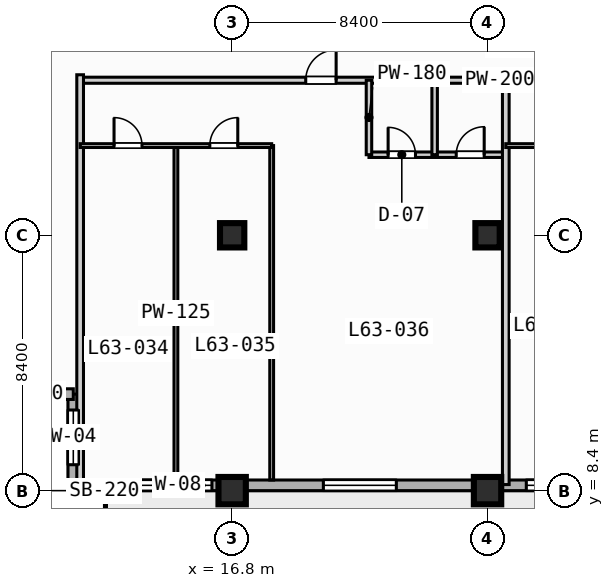
"""IFC4 building model, lengths in metres.
Left out: names, types, materials, properties, quantities, classifications, styles, units other than length and angle.
Written with IfcOpenShell. Run it as: python <this file> out.ifc"""

import sys

from ifc_helpers import new_model, si_unit, direction, frame, frame_2d, origin, origin_2d, place, context, subcontext, project, spatial, rectangle, extrude, element, fill, save


model = new_model("IFC4")
c1 = context("Model", 3, precision=1e-05, world=origin(), true_north=direction((0.0, 1.0)))
c2 = subcontext(c1, "Body", "Model", "MODEL_VIEW")
j1 = project(units=[si_unit("LENGTHUNIT", "METRE"), si_unit("PLANEANGLEUNIT", "RADIAN")], contexts=[c1])
p1 = place(None, origin())
s1 = spatial("IfcSite", under=j1, at=p1, CompositionType="ELEMENT")
p2 = place(p1, origin())
s2 = spatial("IfcBuilding", under=s1, at=p2, CompositionType="ELEMENT")
p3 = place(p2, frame((0.0, 0.0, 256.4)))
s3 = spatial("IfcBuildingStorey", under=s2, at=p3, CompositionType="ELEMENT", Elevation=256.4)
p4 = place(p3, frame((16.8, 8.4, 0.0), z_axis=(0.0, 0.0, 1.0), x_axis=(1.0, 0.0, 0.0)))
e1 = element("IfcColumn", 1, at=p4, inside=s3, PredefinedType="COLUMN", context=c2, shape_type="SweptSolid", body=[
    extrude(rectangle(XDim=0.9, YDim=0.9, at=origin_2d()), origin(), (0.0, 0.0, 1.0), 3.7),
])
p5 = place(p3, frame((16.8, 16.8, 0.0), z_axis=(0.0, 0.0, 1.0), x_axis=(1.0, 0.0, 0.0)))
e2 = element("IfcColumn", 2, at=p5, inside=s3, PredefinedType="COLUMN", context=c2, shape_type="SweptSolid", body=[
    extrude(rectangle(XDim=0.8, YDim=0.8, at=origin_2d()), origin(), (0.0, 0.0, 1.0), 3.7),
])
p6 = place(p3, frame((25.2, 8.4, 0.0), z_axis=(0.0, 0.0, 1.0), x_axis=(1.0, 0.0, 0.0)))
e3 = element("IfcColumn", 3, at=p6, inside=s3, PredefinedType="COLUMN", context=c2, shape_type="SweptSolid", body=[
    extrude(rectangle(XDim=0.9, YDim=0.9, at=origin_2d()), origin(), (0.0, 0.0, 1.0), 3.7),
])
p7 = place(p3, frame((25.2, 16.8, 0.0), z_axis=(0.0, 0.0, 1.0), x_axis=(1.0, 0.0, 0.0)))
e4 = element("IfcColumn", 4, at=p7, inside=s3, PredefinedType="COLUMN", context=c2, shape_type="SweptSolid", body=[
    extrude(rectangle(XDim=0.8, YDim=0.8, at=origin_2d()), origin(), (0.0, 0.0, 1.0), 3.7),
])
p8 = place(p3, frame((11.575, 8.575, 0.0), z_axis=(0.0, 0.0, 1.0), x_axis=(0.0, 1.0, 0.0)))
e5 = element("IfcWall", 5, at=p8, inside=s3, PredefinedType="STANDARD", context=c2, shape_type="SweptSolid", body=[
    extrude(rectangle(XDim=3.0, YDim=0.35, at=frame_2d((1.5, 0.0))), origin(), (0.0, 0.0, 1.0), 3.47),
])
p9 = place(p8, frame((0.677, 0.0, 0.85)))
e6 = element("IfcOpeningElement", 6, at=p9, cuts=e5, PredefinedType="OPENING", context=c2, shape_type="SweptSolid", body=[
    extrude(rectangle(XDim=1.8, YDim=1.8, at=frame_2d((0.9, 0.9))), frame((0.0, 0.185, 0.0), z_axis=(0.0, -1.0, 0.0), x_axis=(1.0, 0.0, 0.0)), (0.0, 0.0, 1.0), 0.37),
])
p10 = place(p3, frame((11.575, 11.575, 0.0), z_axis=(0.0, 0.0, 1.0), x_axis=(-1.0, 0.0, 0.0)))
e7 = element("IfcWall", 7, at=p10, inside=s3, PredefinedType="STANDARD", context=c2, shape_type="SweptSolid", body=[
    extrude(rectangle(XDim=3.0, YDim=0.35, at=frame_2d((1.5, 0.0))), origin(), (0.0, 0.0, 1.0), 3.47),
])
p11 = place(p3, frame((72.425, 8.575, 0.0), z_axis=(0.0, 0.0, 1.0), x_axis=(-1.0, 0.0, 0.0)))
e8 = element("IfcWall", 8, at=p11, inside=s3, PredefinedType="STANDARD", context=c2, shape_type="SweptSolid", body=[
    extrude(rectangle(XDim=60.85, YDim=0.35, at=frame_2d((30.425, 0.0))), origin(), (0.0, 0.0, 1.0), 3.47),
])
p12 = place(p11, frame((41.325, 0.0, 0.0)))
e9 = element("IfcOpeningElement", 9, at=p12, cuts=e8, PredefinedType="OPENING", context=c2, shape_type="SweptSolid", body=[
    extrude(rectangle(XDim=1.4, YDim=2.2, at=frame_2d((0.7, 1.1))), frame((0.0, 0.185, 0.0), z_axis=(0.0, -1.0, 0.0), x_axis=(1.0, 0.0, 0.0)), (0.0, 0.0, 1.0), 0.37),
])
p13 = place(p11, frame((50.225, 0.0, 0.85)))
e10 = element("IfcOpeningElement", 10, at=p13, cuts=e8, PredefinedType="OPENING", context=c2, shape_type="SweptSolid", body=[
    extrude(rectangle(XDim=2.4, YDim=1.95, at=frame_2d((1.2, 0.975))), frame((0.0, 0.185, 0.0), z_axis=(0.0, -1.0, 0.0), x_axis=(1.0, 0.0, 0.0)), (0.0, 0.0, 1.0), 0.37),
])
p14 = place(p11, frame((33.425, 0.0, 0.85)))
e11 = element("IfcOpeningElement", 11, at=p14, cuts=e8, PredefinedType="OPENING", context=c2, shape_type="SweptSolid", body=[
    extrude(rectangle(XDim=2.4, YDim=1.95, at=frame_2d((1.2, 0.975))), frame((0.0, 0.185, 0.0), z_axis=(0.0, -1.0, 0.0), x_axis=(1.0, 0.0, 0.0)), (0.0, 0.0, 1.0), 0.37),
])
p15 = place(p11, frame((25.325, 0.0, 0.85)))
e12 = element("IfcOpeningElement", 12, at=p15, cuts=e8, PredefinedType="OPENING", context=c2, shape_type="SweptSolid", body=[
    extrude(rectangle(XDim=1.8, YDim=1.8, at=frame_2d((0.9, 0.9))), frame((0.0, 0.185, 0.0), z_axis=(0.0, -1.0, 0.0), x_axis=(1.0, 0.0, 0.0)), (0.0, 0.0, 1.0), 0.37),
])
p16 = place(p11, frame((58.15, 0.0, 0.85)))
e13 = element("IfcOpeningElement", 13, at=p16, cuts=e8, PredefinedType="OPENING", context=c2, shape_type="SweptSolid", body=[
    extrude(rectangle(XDim=1.8, YDim=1.8, at=frame_2d((0.9, 0.9))), frame((0.0, 0.185, 0.0), z_axis=(0.0, -1.0, 0.0), x_axis=(1.0, 0.0, 0.0)), (0.0, 0.0, 1.0), 0.37),
])
p17 = place(p11, frame((56.29, 0.0, 0.85)))
e14 = element("IfcOpeningElement", 14, at=p17, cuts=e8, PredefinedType="OPENING", context=c2, shape_type="SweptSolid", body=[
    extrude(rectangle(XDim=0.72, YDim=1.8, at=frame_2d((0.36, 0.9))), frame((0.0, 0.185, 0.0), z_axis=(0.0, -1.0, 0.0), x_axis=(1.0, 0.0, 0.0)), (0.0, 0.0, 1.0), 0.37),
])
p18 = place(p11, frame((44.15, 0.0, 0.85)))
e15 = element("IfcOpeningElement", 15, at=p18, cuts=e8, PredefinedType="OPENING", context=c2, shape_type="SweptSolid", body=[
    extrude(rectangle(XDim=1.8, YDim=1.8, at=frame_2d((0.9, 0.9))), frame((0.0, 0.185, 0.0), z_axis=(0.0, -1.0, 0.0), x_axis=(1.0, 0.0, 0.0)), (0.0, 0.0, 1.0), 0.37),
])
p19 = place(p3, frame((11.8, 21.9, 0.0), z_axis=(0.0, 0.0, 1.0), x_axis=(1.0, 0.0, 0.0)))
e16 = element("IfcWall", 16, at=p19, inside=s3, PredefinedType="PARTITIONING", context=c2, shape_type="SweptSolid", body=[
    extrude(rectangle(XDim=27.6, YDim=0.2, at=frame_2d((13.8, 0.0))), origin(), (0.0, 0.0, 1.0), 3.47),
])
p20 = place(p19, frame((7.42, 0.0, 0.0)))
e17 = element("IfcOpeningElement", 17, at=p20, cuts=e16, PredefinedType="OPENING", context=c2, shape_type="SweptSolid", body=[
    extrude(rectangle(XDim=1.0, YDim=2.15, at=frame_2d((0.5, 1.075))), frame((0.0, 0.11, 0.0), z_axis=(0.0, -1.0, 0.0), x_axis=(1.0, 0.0, 0.0)), (0.0, 0.0, 1.0), 0.22),
])
p21 = place(p19, frame((21.22, 0.0, 0.0)))
e18 = element("IfcOpeningElement", 18, at=p21, cuts=e16, PredefinedType="OPENING", context=c2, shape_type="SweptSolid", body=[
    extrude(rectangle(XDim=1.0, YDim=2.15, at=frame_2d((0.5, 1.075))), frame((0.0, 0.11, 0.0), z_axis=(0.0, -1.0, 0.0), x_axis=(1.0, 0.0, 0.0)), (0.0, 0.0, 1.0), 0.22),
])
p22 = place(p3, frame((11.8, 8.6, 0.0), z_axis=(0.0, 0.0, 1.0), x_axis=(0.0, 1.0, 0.0)))
e19 = element("IfcWall", 19, at=p22, inside=s3, PredefinedType="PARTITIONING", context=c2, shape_type="SweptSolid", body=[
    extrude(rectangle(XDim=13.48, YDim=0.22, at=frame_2d((6.74, 0.0))), origin(), (0.0, 0.0, 1.0), 3.47),
])
p23 = place(p3, frame((21.3, 19.45, 0.0), z_axis=(0.0, 0.0, 1.0), x_axis=(1.0, 0.0, 0.0)))
e20 = element("IfcWall", 20, at=p23, inside=s3, PredefinedType="PLUMBINGWALL", context=c2, shape_type="SweptSolid", body=[
    extrude(rectangle(XDim=4.5, YDim=0.18, at=frame_2d((2.25, 0.0))), origin(), (0.0, 0.0, 1.0), 3.47),
])
p24 = place(p23, frame((0.63, 0.0, 0.0)))
e21 = element("IfcOpeningElement", 21, at=p24, cuts=e20, PredefinedType="OPENING", context=c2, shape_type="SweptSolid", body=[
    extrude(rectangle(XDim=0.9, YDim=2.1, at=frame_2d((0.45, 1.05))), frame((0.0, 0.1, 0.0), z_axis=(0.0, -1.0, 0.0), x_axis=(1.0, 0.0, 0.0)), (0.0, 0.0, 1.0), 0.2),
])
p25 = place(p23, frame((2.87, 0.0, 0.0)))
e22 = element("IfcOpeningElement", 22, at=p25, cuts=e20, PredefinedType="OPENING", context=c2, shape_type="SweptSolid", body=[
    extrude(rectangle(XDim=0.92, YDim=2.1, at=frame_2d((0.46, 1.05))), frame((0.0, 0.1, 0.0), z_axis=(0.0, -1.0, 0.0), x_axis=(1.0, 0.0, 0.0)), (0.0, 0.0, 1.0), 0.2),
])
for number, where, z_axis, x_axis in (
    (23, (21.3, 19.45, 0.0), (0.0, 0.0, 1.0), (0.0, 1.0, 0.0)),
    (24, (23.46, 19.45, 0.0), (0.0, 0.0, 1.0), (0.0, 1.0, 0.0)),
):
    element("IfcWall", number, at=place(p3, frame(where, z_axis=z_axis, x_axis=x_axis)), inside=s3, PredefinedType="PLUMBINGWALL", context=c2, shape_type="SweptSolid", body=[
        extrude(rectangle(XDim=2.45, YDim=0.18, at=frame_2d((1.225, 0.0))), origin(), (0.0, 0.0, 1.0), 3.47),
    ])
for number, where, z_axis, x_axis in (
    (25, (14.95, 8.75, 0.0), (0.0, 0.0, 1.0), (0.0, 1.0, 0.0)),
    (26, (18.1, 8.75, 0.0), (0.0, 0.0, 1.0), (0.0, 1.0, 0.0)),
):
    element("IfcWall", number, at=place(p3, frame(where, z_axis=z_axis, x_axis=x_axis)), inside=s3, PredefinedType="PARTITIONING", context=c2, shape_type="SweptSolid", body=[
        extrude(rectangle(XDim=11.0, YDim=0.125, at=frame_2d((5.5, 0.0))), origin(), (0.0, 0.0, 1.0), 3.47),
    ])
p26 = place(p3, frame((11.8, 19.75, 0.0), z_axis=(0.0, 0.0, 1.0), x_axis=(1.0, 0.0, 0.0)))
e27 = element("IfcWall", 27, at=p26, inside=s3, PredefinedType="PARTITIONING", context=c2, shape_type="SweptSolid", body=[
    extrude(rectangle(XDim=6.3, YDim=0.125, at=frame_2d((3.15, 0.0))), origin(), (0.0, 0.0, 1.0), 3.47),
])
p27 = place(p26, frame((1.115, 0.0, 0.0)))
e28 = element("IfcOpeningElement", 28, at=p27, cuts=e27, PredefinedType="OPENING", context=c2, shape_type="SweptSolid", body=[
    extrude(rectangle(XDim=0.92, YDim=2.1, at=frame_2d((0.46, 1.05))), frame((0.0, 0.073, 0.0), z_axis=(0.0, -1.0, 0.0), x_axis=(1.0, 0.0, 0.0)), (0.0, 0.0, 1.0), 0.145),
])
p28 = place(p26, frame((4.265, 0.0, 0.0)))
e29 = element("IfcOpeningElement", 29, at=p28, cuts=e27, PredefinedType="OPENING", context=c2, shape_type="SweptSolid", body=[
    extrude(rectangle(XDim=0.92, YDim=2.1, at=frame_2d((0.46, 1.05))), frame((0.0, 0.073, 0.0), z_axis=(0.0, -1.0, 0.0), x_axis=(1.0, 0.0, 0.0)), (0.0, 0.0, 1.0), 0.145),
])
p29 = place(p3, frame((25.8, 8.6, 0.0), z_axis=(0.0, 0.0, 1.0), x_axis=(0.0, 1.0, 0.0)))
e30 = element("IfcWall", 30, at=p29, inside=s3, PredefinedType="PARTITIONING", context=c2, shape_type="SweptSolid", body=[
    extrude(rectangle(XDim=13.48, YDim=0.22, at=frame_2d((6.74, 0.0))), origin(), (0.0, 0.0, 1.0), 3.47),
])
p30 = place(p3, frame((25.8, 19.75, 0.0), z_axis=(0.0, 0.0, 1.0), x_axis=(1.0, 0.0, 0.0)))
e31 = element("IfcWall", 31, at=p30, inside=s3, PredefinedType="PARTITIONING", context=c2, shape_type="SweptSolid", body=[
    extrude(rectangle(XDim=6.3, YDim=0.125, at=frame_2d((3.15, 0.0))), origin(), (0.0, 0.0, 1.0), 3.47),
])
p31 = place(p30, frame((1.115, 0.0, 0.0)))
e32 = element("IfcOpeningElement", 32, at=p31, cuts=e31, PredefinedType="OPENING", context=c2, shape_type="SweptSolid", body=[
    extrude(rectangle(XDim=0.92, YDim=2.1, at=frame_2d((0.46, 1.05))), frame((0.0, 0.073, 0.0), z_axis=(0.0, -1.0, 0.0), x_axis=(1.0, 0.0, 0.0)), (0.0, 0.0, 1.0), 0.145),
])
p32 = place(p30, frame((4.265, 0.0, 0.0)))
e33 = element("IfcOpeningElement", 33, at=p32, cuts=e31, PredefinedType="OPENING", context=c2, shape_type="SweptSolid", body=[
    extrude(rectangle(XDim=0.92, YDim=2.1, at=frame_2d((0.46, 1.05))), frame((0.0, 0.073, 0.0), z_axis=(0.0, -1.0, 0.0), x_axis=(1.0, 0.0, 0.0)), (0.0, 0.0, 1.0), 0.145),
])
p33 = place(p9, origin())
e34 = element("IfcWindow", 34, at=p33, inside=s3, PartitioningType="SINGLE_PANEL", PredefinedType="WINDOW", context=c2, shape_type="SweptSolid", body=[
    extrude(rectangle(XDim=1.8, YDim=1.8, at=frame_2d((0.9, 0.9))), frame((0.0, 0.03, 0.0), z_axis=(0.0, -1.0, 0.0), x_axis=(1.0, 0.0, 0.0)), (0.0, 0.0, 1.0), 0.06),
])
fill(e6, e34)
p34 = place(p13, origin())
e35 = element("IfcWindow", 35, at=p34, inside=s3, PartitioningType="SINGLE_PANEL", PredefinedType="WINDOW", context=c2, shape_type="SweptSolid", body=[
    extrude(rectangle(XDim=2.4, YDim=1.95, at=frame_2d((1.2, 0.975))), frame((0.0, 0.03, 0.0), z_axis=(0.0, -1.0, 0.0), x_axis=(1.0, 0.0, 0.0)), (0.0, 0.0, 1.0), 0.06),
])
fill(e10, e35)
p35 = place(p16, origin())
e36 = element("IfcWindow", 36, at=p35, inside=s3, PartitioningType="SINGLE_PANEL", PredefinedType="WINDOW", context=c2, shape_type="SweptSolid", body=[
    extrude(rectangle(XDim=1.8, YDim=1.8, at=frame_2d((0.9, 0.9))), frame((0.0, 0.03, 0.0), z_axis=(0.0, -1.0, 0.0), x_axis=(1.0, 0.0, 0.0)), (0.0, 0.0, 1.0), 0.06),
])
fill(e13, e36)
p36 = place(p17, origin())
e37 = element("IfcWindow", 37, at=p36, inside=s3, PartitioningType="SINGLE_PANEL", PredefinedType="WINDOW", context=c2, shape_type="SweptSolid", body=[
    extrude(rectangle(XDim=0.72, YDim=1.8, at=frame_2d((0.36, 0.9))), frame((0.0, 0.03, 0.0), z_axis=(0.0, -1.0, 0.0), x_axis=(1.0, 0.0, 0.0)), (0.0, 0.0, 1.0), 0.06),
])
fill(e14, e37)
p37 = place(p18, origin())
e38 = element("IfcWindow", 38, at=p37, inside=s3, PartitioningType="SINGLE_PANEL", PredefinedType="WINDOW", context=c2, shape_type="SweptSolid", body=[
    extrude(rectangle(XDim=1.8, YDim=1.8, at=frame_2d((0.9, 0.9))), frame((0.0, 0.03, 0.0), z_axis=(0.0, -1.0, 0.0), x_axis=(1.0, 0.0, 0.0)), (0.0, 0.0, 1.0), 0.06),
])
fill(e15, e38)
p38 = place(p20, origin())
e39 = element("IfcDoor", 39, at=p38, inside=s3, OperationType="SINGLE_SWING_RIGHT", PredefinedType="DOOR", context=c2, shape_type="SweptSolid", body=[
    extrude(rectangle(XDim=1.0, YDim=2.15, at=frame_2d((0.5, 1.075))), frame((0.0, 0.025, 0.0), z_axis=(0.0, -1.0, 0.0), x_axis=(1.0, 0.0, 0.0)), (0.0, 0.0, 1.0), 0.05),
])
fill(e17, e39)
p39 = place(p24, origin())
e40 = element("IfcDoor", 40, at=p39, inside=s3, OperationType="SINGLE_SWING_LEFT", PredefinedType="DOOR", context=c2, shape_type="SweptSolid", body=[
    extrude(rectangle(XDim=0.9, YDim=2.1, at=frame_2d((0.45, 1.05))), frame((0.0, 0.025, 0.0), z_axis=(0.0, -1.0, 0.0), x_axis=(1.0, 0.0, 0.0)), (0.0, 0.0, 1.0), 0.05),
])
fill(e21, e40)
p40 = place(p25, origin())
e41 = element("IfcDoor", 41, at=p40, inside=s3, OperationType="SINGLE_SWING_RIGHT", PredefinedType="DOOR", context=c2, shape_type="SweptSolid", body=[
    extrude(rectangle(XDim=0.92, YDim=2.1, at=frame_2d((0.46, 1.05))), frame((0.0, 0.025, 0.0), z_axis=(0.0, -1.0, 0.0), x_axis=(1.0, 0.0, 0.0)), (0.0, 0.0, 1.0), 0.05),
])
fill(e22, e41)
p41 = place(p27, origin())
e42 = element("IfcDoor", 42, at=p41, inside=s3, OperationType="SINGLE_SWING_LEFT", PredefinedType="DOOR", context=c2, shape_type="SweptSolid", body=[
    extrude(rectangle(XDim=0.92, YDim=2.1, at=frame_2d((0.46, 1.05))), frame((0.0, 0.025, 0.0), z_axis=(0.0, -1.0, 0.0), x_axis=(1.0, 0.0, 0.0)), (0.0, 0.0, 1.0), 0.05),
])
fill(e28, e42)
p42 = place(p28, origin())
e43 = element("IfcDoor", 43, at=p42, inside=s3, OperationType="SINGLE_SWING_RIGHT", PredefinedType="DOOR", context=c2, shape_type="SweptSolid", body=[
    extrude(rectangle(XDim=0.92, YDim=2.1, at=frame_2d((0.46, 1.05))), frame((0.0, 0.025, 0.0), z_axis=(0.0, -1.0, 0.0), x_axis=(1.0, 0.0, 0.0)), (0.0, 0.0, 1.0), 0.05),
])
fill(e29, e43)
save(model, sys.argv[1])
